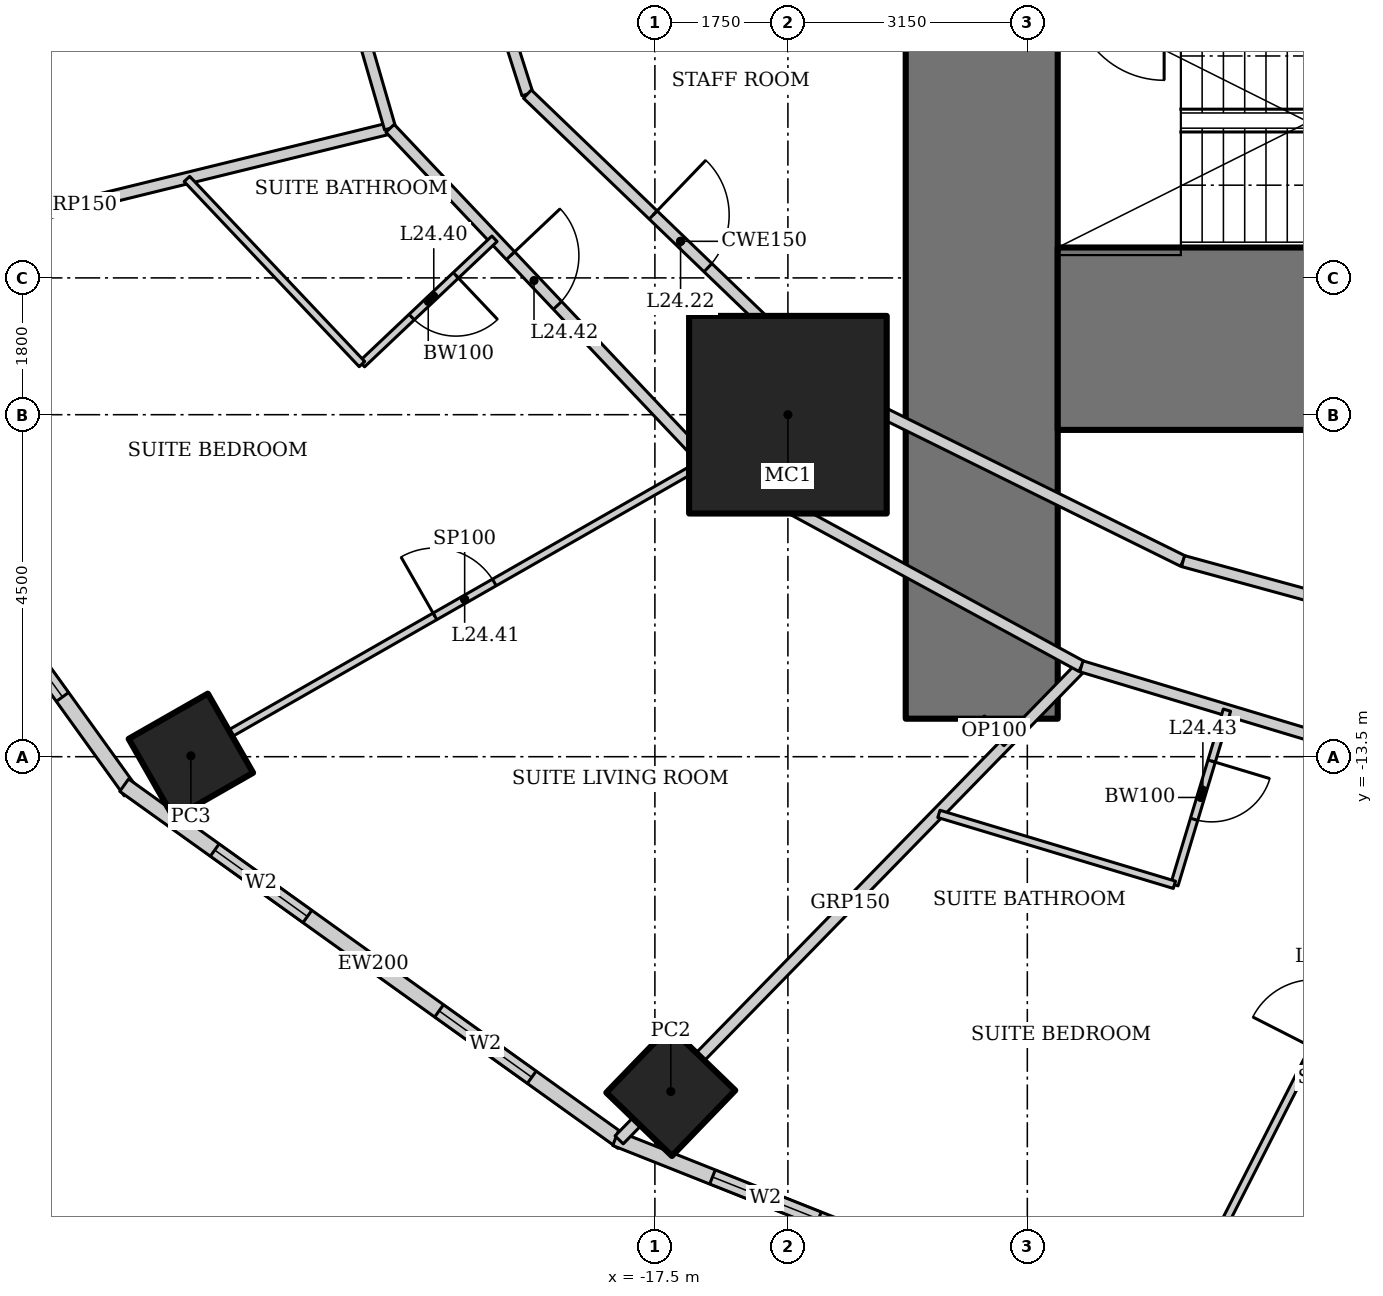
"""IFC4 building model, lengths in metres.
Left out: names, types, materials, properties, quantities, classifications, styles, units other than length and angle.
Written with IfcOpenShell. Run it as: python <this file> out.ifc"""

import sys

from ifc_helpers import new_model, si_unit, direction, frame, frame_2d, origin, origin_2d, place, context, subcontext, project, spatial, rectangle, hollow_rectangle, extrude, element, fill, save


model = new_model("IFC4")
c1 = context("Model", 3, precision=1e-05, world=origin(), true_north=direction((0.0, 1.0)))
c2 = subcontext(c1, "Body", "Model", "MODEL_VIEW")
j1 = project(units=[si_unit("LENGTHUNIT", "METRE"), si_unit("PLANEANGLEUNIT", "RADIAN")], contexts=[c1])
p1 = place(None, origin())
s1 = spatial("IfcSite", under=j1, at=p1, CompositionType="ELEMENT")
p2 = place(p1, origin())
s2 = spatial("IfcBuilding", under=s1, at=p2, CompositionType="ELEMENT")
p3 = place(p2, frame((0.0, 0.0, 101.8)))
s3 = spatial("IfcBuildingStorey", under=s2, at=p3, CompositionType="ELEMENT", Elevation=101.8)
p4 = place(p3, frame((-15.75, -9.0, 0.0), z_axis=(0.0, 0.0, 1.0), x_axis=(1.0, 0.0, 0.0)))
e1 = element("IfcColumn", 1, at=p4, inside=s3, PredefinedType="COLUMN", context=c2, shape_type="SweptSolid", body=[
    extrude(hollow_rectangle(XDim=2.6, YDim=2.6, WallThickness=0.13, at=origin_2d()), origin(), (0.0, 0.0, 1.0), 3.6),
])
p5 = place(p3, frame((-23.605, -13.489, 0.0), z_axis=(0.0, 0.0, 1.0), x_axis=(0.86824298017, 0.496139221777, 0.0)))
e2 = element("IfcColumn", 2, at=p5, inside=s3, PredefinedType="COLUMN", context=c2, shape_type="SweptSolid", body=[
    extrude(hollow_rectangle(XDim=1.2, YDim=1.2, WallThickness=0.12, at=origin_2d()), origin(), (0.0, 0.0, 1.0), 2.28),
])
p6 = place(p3, frame((-17.291, -17.905, 0.0), z_axis=(0.0, 0.0, 1.0), x_axis=(0.694658370459, 0.719339800339, 0.0)))
e3 = element("IfcColumn", 3, at=p6, inside=s3, PredefinedType="COLUMN", context=c2, shape_type="SweptSolid", body=[
    extrude(hollow_rectangle(XDim=1.2, YDim=1.2, WallThickness=0.1, at=origin_2d()), origin(), (0.0, 0.0, 1.0), 2.28),
])
p7 = place(p3, frame((-13.2, 13.0, 0.0), z_axis=(0.0, 0.0, 1.0), x_axis=(0.0, -1.0, 0.0)))
e4 = element("IfcWall", 4, at=p7, inside=s3, PredefinedType="SHEAR", context=c2, shape_type="SweptSolid", body=[
    extrude(rectangle(XDim=26.0, YDim=2.0, at=frame_2d((13.0, 0.0))), origin(), (0.0, 0.0, 1.0), 3.6),
])
p8 = place(p7, frame((12.1, 0.0, 0.0)))
e5 = element("IfcOpeningElement", 5, at=p8, cuts=e4, PredefinedType="OPENING", context=c2, shape_type="SweptSolid", body=[
    extrude(rectangle(XDim=1.8, YDim=2.1, at=frame_2d((0.9, 1.05))), frame((0.0, 1.01, 0.0), z_axis=(0.0, -1.0, 0.0), x_axis=(1.0, 0.0, 0.0)), (0.0, 0.0, 1.0), 2.02),
])
p9 = place(p3, frame((-12.2, -8.0, 0.0), z_axis=(0.0, 0.0, 1.0), x_axis=(1.0, 0.0, 0.0)))
e6 = element("IfcWall", 6, at=p9, inside=s3, PredefinedType="SHEAR", context=c2, shape_type="SweptSolid", body=[
    extrude(rectangle(XDim=24.4, YDim=2.4, at=frame_2d((12.2, 0.0))), origin(), (0.0, 0.0, 1.0), 3.6),
])
p10 = place(p3, frame((-29.26, -7.2, 0.0), z_axis=(0.0, 0.0, 1.0), x_axis=(0.583937613703, -0.811798536155, 0.0)))
e7 = element("IfcWall", 7, at=p10, inside=s3, PredefinedType="SOLIDWALL", context=c2, shape_type="SweptSolid", body=[
    extrude(rectangle(XDim=8.323, YDim=0.2, at=frame_2d((4.162, 0.0))), origin(), (0.0, 0.0, 1.0), 3.4),
])
p11 = place(p10, frame((1.531, 0.0, 0.5)))
e8 = element("IfcOpeningElement", 8, at=p11, cuts=e7, PredefinedType="OPENING", context=c2, shape_type="SweptSolid", body=[
    extrude(rectangle(XDim=1.5, YDim=2.2, at=frame_2d((0.75, 1.1))), frame((0.0, 0.11, 0.0), z_axis=(0.0, -1.0, 0.0), x_axis=(1.0, 0.0, 0.0)), (0.0, 0.0, 1.0), 0.22),
])
p12 = place(p10, frame((5.292, 0.0, 0.5)))
e9 = element("IfcOpeningElement", 9, at=p12, cuts=e7, PredefinedType="OPENING", context=c2, shape_type="SweptSolid", body=[
    extrude(rectangle(XDim=1.5, YDim=2.2, at=frame_2d((0.75, 1.1))), frame((0.0, 0.11, 0.0), z_axis=(0.0, -1.0, 0.0), x_axis=(1.0, 0.0, 0.0)), (0.0, 0.0, 1.0), 0.22),
])
p13 = place(p3, frame((-24.482, -13.875, 0.0), z_axis=(0.0, 0.0, 1.0), x_axis=(0.812791321576, -0.582554948112, 0.0)))
e10 = element("IfcWall", 10, at=p13, inside=s3, PredefinedType="SOLIDWALL", context=c2, shape_type="SweptSolid", body=[
    extrude(rectangle(XDim=8.063, YDim=0.2, at=frame_2d((4.032, 0.0))), origin(), (0.0, 0.0, 1.0), 3.4),
])
p14 = place(p13, frame((1.466, 0.0, 0.5)))
e11 = element("IfcOpeningElement", 11, at=p14, cuts=e10, PredefinedType="OPENING", context=c2, shape_type="SweptSolid", body=[
    extrude(rectangle(XDim=1.5, YDim=2.2, at=frame_2d((0.75, 1.1))), frame((0.0, 0.11, 0.0), z_axis=(0.0, -1.0, 0.0), x_axis=(1.0, 0.0, 0.0)), (0.0, 0.0, 1.0), 0.22),
])
p15 = place(p13, frame((5.097, 0.0, 0.5)))
e12 = element("IfcOpeningElement", 12, at=p15, cuts=e10, PredefinedType="OPENING", context=c2, shape_type="SweptSolid", body=[
    extrude(rectangle(XDim=1.5, YDim=2.2, at=frame_2d((0.75, 1.1))), frame((0.0, 0.11, 0.0), z_axis=(0.0, -1.0, 0.0), x_axis=(1.0, 0.0, 0.0)), (0.0, 0.0, 1.0), 0.22),
])
p16 = place(p3, frame((-18.018, -18.523, 0.0), z_axis=(0.0, 0.0, 1.0), x_axis=(0.929358351251, -0.369178892895, 0.0)))
e13 = element("IfcWall", 13, at=p16, inside=s3, PredefinedType="SOLIDWALL", context=c2, shape_type="SweptSolid", body=[
    extrude(rectangle(XDim=7.692, YDim=0.2, at=frame_2d((3.846, 0.0))), origin(), (0.0, 0.0, 1.0), 3.4),
])
p17 = place(p16, frame((1.373, 0.0, 0.5)))
e14 = element("IfcOpeningElement", 14, at=p17, cuts=e13, PredefinedType="OPENING", context=c2, shape_type="SweptSolid", body=[
    extrude(rectangle(XDim=1.5, YDim=2.2, at=frame_2d((0.75, 1.1))), frame((0.0, 0.11, 0.0), z_axis=(0.0, -1.0, 0.0), x_axis=(1.0, 0.0, 0.0)), (0.0, 0.0, 1.0), 0.22),
])
p18 = place(p16, frame((4.819, 0.0, 0.5)))
e15 = element("IfcOpeningElement", 15, at=p18, cuts=e13, PredefinedType="OPENING", context=c2, shape_type="SweptSolid", body=[
    extrude(rectangle(XDim=1.5, YDim=2.2, at=frame_2d((0.75, 1.1))), frame((0.0, 0.11, 0.0), z_axis=(0.0, -1.0, 0.0), x_axis=(1.0, 0.0, 0.0)), (0.0, 0.0, 1.0), 0.22),
])
p19 = place(p3, frame((-29.222, -7.254, 0.0), z_axis=(0.0, 0.0, 1.0), x_axis=(0.971178166182, 0.238354713676, 0.0)))
e16 = element("IfcWall", 16, at=p19, inside=s3, PredefinedType="PARTITIONING", context=c2, shape_type="SweptSolid", body=[
    extrude(rectangle(XDim=8.482, YDim=0.15, at=frame_2d((4.241, 0.0))), origin(), (0.0, 0.0, 1.0), 1.9),
])
p20 = place(p3, frame((-17.97, -18.542, 0.0), z_axis=(0.0, 0.0, 1.0), x_axis=(0.698503223934, 0.715606907564, 0.0)))
e17 = element("IfcWall", 17, at=p20, inside=s3, PredefinedType="PARTITIONING", context=c2, shape_type="SweptSolid", body=[
    extrude(rectangle(XDim=8.707, YDim=0.15, at=frame_2d((4.354, 0.0))), origin(), (0.0, 0.0, 1.0), 2.463),
])
p21 = place(p3, frame((-22.5, 0.0, 0.0), z_axis=(0.0, 0.0, 1.0), x_axis=(0.278247435376, -0.960509429785, 0.0)))
e18 = element("IfcWall", 18, at=p21, inside=s3, PredefinedType="PARTITIONING", context=c2, shape_type="SweptSolid", body=[
    extrude(rectangle(XDim=5.447, YDim=0.15, at=frame_2d((2.724, 0.0))), origin(), (0.0, 0.0, 1.0), 3.4),
])
p22 = place(p21, frame((0.15, 0.0, 0.0)))
e19 = element("IfcOpeningElement", 19, at=p22, cuts=e18, PredefinedType="OPENING", context=c2, shape_type="SweptSolid", body=[
    extrude(rectangle(XDim=0.9, YDim=2.1, at=frame_2d((0.45, 1.05))), frame((0.0, 0.085, 0.0), z_axis=(0.0, -1.0, 0.0), x_axis=(1.0, 0.0, 0.0)), (0.0, 0.0, 1.0), 0.17),
])
p23 = place(p3, frame((-20.984, -5.232, 0.0), z_axis=(0.0, 0.0, 1.0), x_axis=(0.687062608696, -0.726598218916, 0.0)))
e20 = element("IfcWall", 20, at=p23, inside=s3, PredefinedType="PARTITIONING", context=c2, shape_type="SweptSolid", body=[
    extrude(rectangle(XDim=6.039, YDim=0.15, at=frame_2d((3.02, 0.0))), origin(), (0.0, 0.0, 1.0), 3.4),
])
p24 = place(p23, frame((2.306, 0.0, 0.0)))
e21 = element("IfcOpeningElement", 21, at=p24, cuts=e20, PredefinedType="OPENING", context=c2, shape_type="SweptSolid", body=[
    extrude(rectangle(XDim=0.9, YDim=2.1, at=frame_2d((0.45, 1.05))), frame((0.0, 0.085, 0.0), z_axis=(0.0, -1.0, 0.0), x_axis=(1.0, 0.0, 0.0)), (0.0, 0.0, 1.0), 0.17),
])
p25 = place(p3, frame((-16.835, -9.62, 0.0), z_axis=(0.0, 0.0, 1.0), x_axis=(0.878450059298, -0.477834169267, 0.0)))
e22 = element("IfcWall", 22, at=p25, inside=s3, PredefinedType="PARTITIONING", context=c2, shape_type="SweptSolid", body=[
    extrude(rectangle(XDim=5.631, YDim=0.15, at=frame_2d((2.815, 0.0))), origin(), (0.0, 0.0, 1.0), 3.4),
])
p26 = place(p3, frame((-11.888, -12.311, 0.0), z_axis=(0.0, 0.0, 1.0), x_axis=(0.957564241242, -0.288219922793, 0.0)))
e23 = element("IfcWall", 23, at=p26, inside=s3, PredefinedType="PARTITIONING", context=c2, shape_type="SweptSolid", body=[
    extrude(rectangle(XDim=5.085, YDim=0.15, at=frame_2d((2.542, 0.0))), origin(), (0.0, 0.0, 1.0), 3.4),
])
p27 = place(p3, frame((-20.413, -0.9, 0.0), z_axis=(0.0, 0.0, 1.0), x_axis=(0.303505448228, -0.952829702988, 0.0)))
e24 = element("IfcWall", 24, at=p27, inside=s3, PredefinedType="PARTITIONING", context=c2, shape_type="SweptSolid", body=[
    extrude(rectangle(XDim=4.073, YDim=0.15, at=frame_2d((2.037, 0.0))), origin(), (0.0, 0.0, 1.0), 3.4),
])
p28 = place(p3, frame((-19.177, -4.781, 0.0), z_axis=(0.0, 0.0, 1.0), x_axis=(0.720837261072, -0.693104352209, 0.0)))
e25 = element("IfcWall", 25, at=p28, inside=s3, PredefinedType="PARTITIONING", context=c2, shape_type="SweptSolid", body=[
    extrude(rectangle(XDim=5.59, YDim=0.15, at=frame_2d((2.795, 0.0))), origin(), (0.0, 0.0, 1.0), 3.4),
])
p29 = place(p28, frame((2.295, 0.0, 0.0)))
e26 = element("IfcOpeningElement", 26, at=p29, cuts=e25, PredefinedType="OPENING", context=c2, shape_type="SweptSolid", body=[
    extrude(rectangle(XDim=1.0, YDim=2.1, at=frame_2d((0.5, 1.05))), frame((0.0, 0.085, 0.0), z_axis=(0.0, -1.0, 0.0), x_axis=(1.0, 0.0, 0.0)), (0.0, 0.0, 1.0), 0.17),
])
p30 = place(p3, frame((-15.147, -8.656, 0.0), z_axis=(0.0, 0.0, 1.0), x_axis=(0.89656943448, -0.442903205177, 0.0)))
e27 = element("IfcWall", 27, at=p30, inside=s3, PredefinedType="PARTITIONING", context=c2, shape_type="SweptSolid", body=[
    extrude(rectangle(XDim=5.126, YDim=0.15, at=frame_2d((2.563, 0.0))), origin(), (0.0, 0.0, 1.0), 3.4),
])
p31 = place(p3, frame((-10.551, -10.926, 0.0), z_axis=(0.0, 0.0, 1.0), x_axis=(0.964644466646, -0.263554648923, 0.0)))
e28 = element("IfcWall", 28, at=p31, inside=s3, PredefinedType="PARTITIONING", context=c2, shape_type="SweptSolid", body=[
    extrude(rectangle(XDim=4.535, YDim=0.15, at=frame_2d((2.268, 0.0))), origin(), (0.0, 0.0, 1.0), 3.4),
])
p32 = place(p31, frame((1.768, 0.0, 0.0)))
e29 = element("IfcOpeningElement", 29, at=p32, cuts=e28, PredefinedType="OPENING", context=c2, shape_type="SweptSolid", body=[
    extrude(rectangle(XDim=1.0, YDim=2.1, at=frame_2d((0.5, 1.05))), frame((0.0, 0.085, 0.0), z_axis=(0.0, -1.0, 0.0), x_axis=(1.0, 0.0, 0.0)), (0.0, 0.0, 1.0), 0.17),
])
p33 = place(p3, frame((-19.61, -6.685, 0.0), z_axis=(0.0, 0.0, 1.0), x_axis=(-0.726564480261, -0.687098287018, 0.0)))
e30 = element("IfcWall", 30, at=p33, inside=s3, PredefinedType="PARTITIONING", context=c2, shape_type="SweptSolid", body=[
    extrude(rectangle(XDim=2.4, YDim=0.1, at=frame_2d((1.2, 0.0))), origin(), (0.0, 0.0, 1.0), 3.4),
])
p34 = place(p33, frame((0.7, 0.0, 0.0)))
e31 = element("IfcOpeningElement", 31, at=p34, cuts=e30, PredefinedType="OPENING", context=c2, shape_type="SweptSolid", body=[
    extrude(rectangle(XDim=0.8, YDim=2.1, at=frame_2d((0.4, 1.05))), frame((0.0, 0.06, 0.0), z_axis=(0.0, -1.0, 0.0), x_axis=(1.0, 0.0, 0.0)), (0.0, 0.0, 1.0), 0.12),
])
p35 = place(p3, frame((-21.354, -8.334, 0.0), z_axis=(0.0, 0.0, 1.0), x_axis=(-0.68705752606, 0.726603024963, 0.0)))
e32 = element("IfcWall", 32, at=p35, inside=s3, PredefinedType="PARTITIONING", context=c2, shape_type="SweptSolid", body=[
    extrude(rectangle(XDim=3.352, YDim=0.1, at=frame_2d((1.676, 0.0))), origin(), (0.0, 0.0, 1.0), 3.4),
])
p36 = place(p3, frame((-23.171, -13.24, 0.0), z_axis=(0.0, 0.0, 1.0), x_axis=(0.868253436131, 0.496120923412, 0.0)))
e33 = element("IfcWall", 33, at=p36, inside=s3, PredefinedType="PARTITIONING", context=c2, shape_type="SweptSolid", body=[
    extrude(rectangle(XDim=7.297, YDim=0.1, at=frame_2d((3.649, 0.0))), origin(), (0.0, 0.0, 1.0), 2.2),
])
p37 = place(p36, frame((3.198, 0.0, 0.0)))
e34 = element("IfcOpeningElement", 34, at=p37, cuts=e33, PredefinedType="OPENING", context=c2, shape_type="SweptSolid", body=[
    extrude(rectangle(XDim=0.9, YDim=2.1, at=frame_2d((0.45, 1.05))), frame((0.0, 0.06, 0.0), z_axis=(0.0, -1.0, 0.0), x_axis=(1.0, 0.0, 0.0)), (0.0, 0.0, 1.0), 0.12),
])
p38 = place(p3, frame((-9.973, -12.887, 0.0), z_axis=(0.0, 0.0, 1.0), x_axis=(-0.288290341405, -0.957543042924, 0.0)))
e35 = element("IfcWall", 35, at=p38, inside=s3, PredefinedType="PARTITIONING", context=c2, shape_type="SweptSolid", body=[
    extrude(rectangle(XDim=2.4, YDim=0.1, at=frame_2d((1.2, 0.0))), origin(), (0.0, 0.0, 1.0), 3.4),
])
p39 = place(p38, frame((0.7, 0.0, 0.0)))
e36 = element("IfcOpeningElement", 36, at=p39, cuts=e35, PredefinedType="OPENING", context=c2, shape_type="SweptSolid", body=[
    extrude(rectangle(XDim=0.8, YDim=2.1, at=frame_2d((0.4, 1.05))), frame((0.0, 0.06, 0.0), z_axis=(0.0, -1.0, 0.0), x_axis=(1.0, 0.0, 0.0)), (0.0, 0.0, 1.0), 0.12),
])
p40 = place(p3, frame((-10.665, -15.185, 0.0), z_axis=(0.0, 0.0, 1.0), x_axis=(-0.957568413147, 0.288206061946, 0.0)))
e37 = element("IfcWall", 37, at=p40, inside=s3, PredefinedType="PARTITIONING", context=c2, shape_type="SweptSolid", body=[
    extrude(rectangle(XDim=3.236, YDim=0.1, at=frame_2d((1.618, 0.0))), origin(), (0.0, 0.0, 1.0), 3.4),
])
p41 = place(p3, frame((-10.236, -20.088, 0.0), z_axis=(0.0, 0.0, 1.0), x_axis=(0.454010445571, 0.890996360998, 0.0)))
e38 = element("IfcWall", 38, at=p41, inside=s3, PredefinedType="PARTITIONING", context=c2, shape_type="SweptSolid", body=[
    extrude(rectangle(XDim=7.084, YDim=0.1, at=frame_2d((3.542, 0.0))), origin(), (0.0, 0.0, 1.0), 2.463),
])
p42 = place(p41, frame((3.092, 0.0, 0.0)))
e39 = element("IfcOpeningElement", 39, at=p42, cuts=e38, PredefinedType="OPENING", context=c2, shape_type="SweptSolid", body=[
    extrude(rectangle(XDim=0.9, YDim=2.1, at=frame_2d((0.45, 1.05))), frame((0.0, 0.06, 0.0), z_axis=(0.0, -1.0, 0.0), x_axis=(1.0, 0.0, 0.0)), (0.0, 0.0, 1.0), 0.12),
])
p43 = place(p3, frame((-13.2, -13.0, 0.0), z_axis=(0.0, 0.0, 1.0), x_axis=(0.715599628005, -0.698510681664, 0.0)))
e40 = element("IfcWall", 40, at=p43, inside=s3, PredefinedType="PARTITIONING", context=c2, shape_type="SweptSolid", body=[
    extrude(rectangle(XDim=0.457, YDim=0.1, at=frame_2d((0.229, 0.0))), origin(), (0.0, 0.0, 1.0), 3.4),
])
p44 = place(p12, origin())
e41 = element("IfcWindow", 41, at=p44, inside=s3, PartitioningType="SINGLE_PANEL", PredefinedType="WINDOW", context=c2, shape_type="SweptSolid", body=[
    extrude(rectangle(XDim=1.5, YDim=2.2, at=frame_2d((0.75, 1.1))), frame((0.0, 0.03, 0.0), z_axis=(0.0, -1.0, 0.0), x_axis=(1.0, 0.0, 0.0)), (0.0, 0.0, 1.0), 0.06),
])
fill(e9, e41)
p45 = place(p14, origin())
e42 = element("IfcWindow", 42, at=p45, inside=s3, PartitioningType="SINGLE_PANEL", PredefinedType="WINDOW", context=c2, shape_type="SweptSolid", body=[
    extrude(rectangle(XDim=1.5, YDim=2.2, at=frame_2d((0.75, 1.1))), frame((0.0, 0.03, 0.0), z_axis=(0.0, -1.0, 0.0), x_axis=(1.0, 0.0, 0.0)), (0.0, 0.0, 1.0), 0.06),
])
fill(e11, e42)
p46 = place(p15, origin())
e43 = element("IfcWindow", 43, at=p46, inside=s3, PartitioningType="SINGLE_PANEL", PredefinedType="WINDOW", context=c2, shape_type="SweptSolid", body=[
    extrude(rectangle(XDim=1.5, YDim=2.2, at=frame_2d((0.75, 1.1))), frame((0.0, 0.03, 0.0), z_axis=(0.0, -1.0, 0.0), x_axis=(1.0, 0.0, 0.0)), (0.0, 0.0, 1.0), 0.06),
])
fill(e12, e43)
p47 = place(p17, origin())
e44 = element("IfcWindow", 44, at=p47, inside=s3, PartitioningType="SINGLE_PANEL", PredefinedType="WINDOW", context=c2, shape_type="SweptSolid", body=[
    extrude(rectangle(XDim=1.5, YDim=2.2, at=frame_2d((0.75, 1.1))), frame((0.0, 0.03, 0.0), z_axis=(0.0, -1.0, 0.0), x_axis=(1.0, 0.0, 0.0)), (0.0, 0.0, 1.0), 0.06),
])
fill(e14, e44)
p48 = place(p29, origin())
e45 = element("IfcDoor", 45, at=p48, inside=s3, OperationType="SINGLE_SWING_LEFT", PredefinedType="DOOR", context=c2, shape_type="SweptSolid", body=[
    extrude(rectangle(XDim=1.0, YDim=2.1, at=frame_2d((0.5, 1.05))), frame((0.0, 0.025, 0.0), z_axis=(0.0, -1.0, 0.0), x_axis=(1.0, 0.0, 0.0)), (0.0, 0.0, 1.0), 0.05),
])
fill(e26, e45)
p49 = place(p34, origin())
e46 = element("IfcDoor", 46, at=p49, inside=s3, OperationType="SINGLE_SWING_LEFT", PredefinedType="DOOR", context=c2, shape_type="SweptSolid", body=[
    extrude(rectangle(XDim=0.8, YDim=2.1, at=frame_2d((0.4, 1.05))), frame((0.0, 0.025, 0.0), z_axis=(0.0, -1.0, 0.0), x_axis=(1.0, 0.0, 0.0)), (0.0, 0.0, 1.0), 0.05),
])
fill(e31, e46)
p50 = place(p37, origin())
e47 = element("IfcDoor", 47, at=p50, inside=s3, OperationType="SINGLE_SWING_LEFT", PredefinedType="DOOR", context=c2, shape_type="SweptSolid", body=[
    extrude(rectangle(XDim=0.9, YDim=2.1, at=frame_2d((0.45, 1.05))), frame((0.0, 0.025, 0.0), z_axis=(0.0, -1.0, 0.0), x_axis=(1.0, 0.0, 0.0)), (0.0, 0.0, 1.0), 0.05),
])
fill(e34, e47)
p51 = place(p24, origin())
e48 = element("IfcDoor", 48, at=p51, inside=s3, OperationType="SINGLE_SWING_LEFT", PredefinedType="DOOR", context=c2, shape_type="SweptSolid", body=[
    extrude(rectangle(XDim=0.9, YDim=2.1, at=frame_2d((0.45, 1.05))), frame((0.0, 0.025, 0.0), z_axis=(0.0, -1.0, 0.0), x_axis=(1.0, 0.0, 0.0)), (0.0, 0.0, 1.0), 0.05),
])
fill(e21, e48)
p52 = place(p39, origin())
e49 = element("IfcDoor", 49, at=p52, inside=s3, OperationType="SINGLE_SWING_LEFT", PredefinedType="DOOR", context=c2, shape_type="SweptSolid", body=[
    extrude(rectangle(XDim=0.8, YDim=2.1, at=frame_2d((0.4, 1.05))), frame((0.0, 0.025, 0.0), z_axis=(0.0, -1.0, 0.0), x_axis=(1.0, 0.0, 0.0)), (0.0, 0.0, 1.0), 0.05),
])
fill(e36, e49)
save(model, sys.argv[1])
